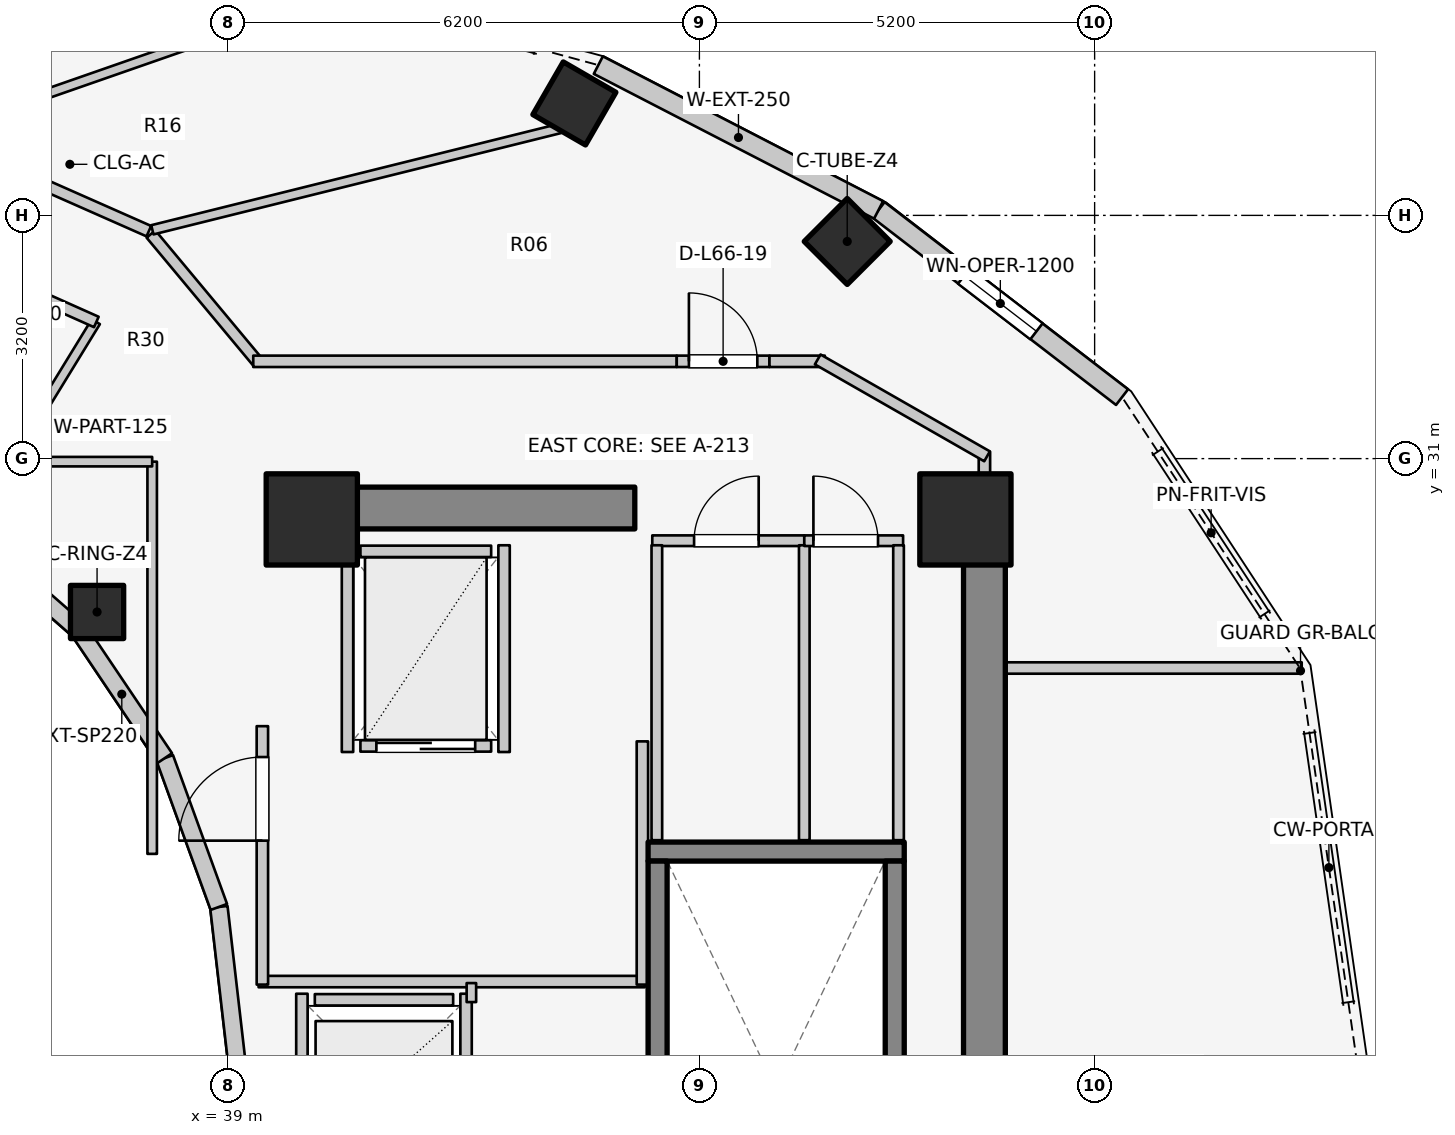
"""IFC4 building model, lengths in metres.
Left out: names, types, materials, properties, quantities, classifications, styles, units other than length and angle.
Written with IfcOpenShell. Run it as: python <this file> out.ifc"""

import sys

from ifc_helpers import new_model, si_unit, direction, frame, frame_2d, origin, origin_2d, place, context, subcontext, project, spatial, rectangle, extrude, element, fill, save


model = new_model("IFC4")
c1 = context("Model", 3, precision=1e-05, world=origin(), true_north=direction((0.0, 1.0)))
c2 = subcontext(c1, "Body", "Model", "MODEL_VIEW")
j1 = project(units=[si_unit("LENGTHUNIT", "METRE"), si_unit("PLANEANGLEUNIT", "RADIAN")], contexts=[c1])
p1 = place(None, origin())
s1 = spatial("IfcSite", under=j1, at=p1, CompositionType="ELEMENT")
p2 = place(p1, origin())
s2 = spatial("IfcBuilding", under=s1, at=p2, CompositionType="ELEMENT")
p3 = place(p2, frame((0.0, 0.0, 217.1)))
s3 = spatial("IfcBuildingStorey", under=s2, at=p3, CompositionType="ELEMENT", Elevation=217.1)
p4 = place(p3, frame((48.95, 17.05, 0.0), z_axis=(0.0, 0.0, 1.0), x_axis=(0.0, 1.0, 0.0)))
e1 = element("IfcWall", 1, at=p4, inside=s3, PredefinedType="SHEAR", context=c2, shape_type="SweptSolid", body=[
    extrude(rectangle(XDim=12.8, YDim=0.55, at=frame_2d((6.4, 0.0))), origin(), (0.0, 0.0, 1.0), 3.1),
])
p5 = place(p3, frame((39.85, 30.35, 0.0), z_axis=(0.0, 0.0, 1.0), x_axis=(1.0, 0.0, 0.0)))
e2 = element("IfcWall", 2, at=p5, inside=s3, PredefinedType="SHEAR", context=c2, shape_type="SweptSolid", body=[
    extrude(rectangle(XDim=4.5, YDim=0.55, at=frame_2d((2.25, 0.0))), origin(), (0.0, 0.0, 1.0), 3.1),
])
p6 = place(p3, frame((44.525, 25.83, 0.0), z_axis=(0.0, 0.0, 1.0), x_axis=(1.0, 0.0, 0.0)))
e3 = element("IfcWall", 3, at=p6, inside=s3, PredefinedType="SOLIDWALL", context=c2, shape_type="SweptSolid", body=[
    extrude(rectangle(XDim=3.37, YDim=0.25, at=frame_2d((1.685, 0.0))), origin(), (0.0, 0.0, 1.0), 3.1),
])
for number, where, z_axis, x_axis in (
    (4, (44.65, 17.895, 0.0), (0.0, 0.0, 1.0), (0.0, 1.0, 0.0)),
    (5, (47.77, 17.895, 0.0), (0.0, 0.0, 1.0), (0.0, 1.0, 0.0)),
):
    element("IfcWall", number, at=place(p3, frame(where, z_axis=z_axis, x_axis=x_axis)), inside=s3, PredefinedType="SOLIDWALL", context=c2, shape_type="SweptSolid", body=[
        extrude(rectangle(XDim=7.81, YDim=0.25, at=frame_2d((3.905, 0.0))), origin(), (0.0, 0.0, 1.0), 3.1),
    ])
for number, where, z_axis, x_axis in (
    (6, (48.7, 30.2, 0.0), (0.0, 0.0, 1.0), (1.0, 0.0, 0.0)),
    (7, (40.1, 30.2, 0.0), (0.0, 0.0, 1.0), (1.0, 0.0, 0.0)),
):
    element("IfcColumn", number, at=place(p3, frame(where, z_axis=z_axis, x_axis=x_axis)), inside=s3, PredefinedType="COLUMN", context=c2, shape_type="SweptSolid", body=[
        extrude(rectangle(XDim=1.2, YDim=1.2, at=origin_2d()), origin(), (0.0, 0.0, 1.0), 3.1),
    ])
p7 = place(p3, frame((37.275, 28.982, 0.0), z_axis=(0.0, 0.0, 1.0), x_axis=(1.0, 0.0, 0.0)))
e8 = element("IfcColumn", 8, at=p7, inside=s3, PredefinedType="COLUMN", context=c2, shape_type="SweptSolid", body=[
    extrude(rectangle(XDim=0.7, YDim=0.7, at=origin_2d()), origin(), (0.0, 0.0, 1.0), 3.1),
])
for number, where, z_axis, x_axis in (
    (9, (47.145, 33.857, 0.0), (0.0, 0.0, 1.0), (0.707, 0.707, 0.0)),
    (10, (43.555, 35.673, 0.0), (0.0, 0.0, 1.0), (0.5, 0.866, 0.0)),
):
    element("IfcColumn", number, at=place(p3, frame(where, z_axis=z_axis, x_axis=x_axis)), inside=s3, PredefinedType="COLUMN", context=c2, shape_type="SweptSolid", body=[
        extrude(rectangle(XDim=0.8, YDim=0.8, at=origin_2d()), origin(), (0.0, 0.0, 1.0), 3.1),
    ])
p8 = place(p3, frame((39.12, 23.0, 0.0), z_axis=(0.0, 0.0, 1.0), x_axis=(-0.114711713601, 0.993398823617, 0.0)))
e11 = element("IfcWall", 11, at=p8, inside=s3, PredefinedType="STANDARD", context=c2, shape_type="SweptSolid", body=[
    extrude(rectangle(XDim=2.115, YDim=0.23, at=frame_2d((1.058, 0.0))), origin(), (0.0, 0.0, 1.0), 2.56),
])
p9 = place(p3, frame((38.877, 25.102, 0.0), z_axis=(0.0, 0.0, 1.0), x_axis=(-0.341423187295, 0.93990968033, 0.0)))
e12 = element("IfcWall", 12, at=p9, inside=s3, PredefinedType="STANDARD", context=c2, shape_type="SweptSolid", body=[
    extrude(rectangle(XDim=2.084, YDim=0.23, at=frame_2d((1.042, 0.0))), origin(), (0.0, 0.0, 1.0), 2.56),
])
p10 = place(p3, frame((38.166, 27.06, 0.0), z_axis=(0.0, 0.0, 1.0), x_axis=(-0.558197800898, 0.829707909492, 0.0)))
e13 = element("IfcWall", 13, at=p10, inside=s3, PredefinedType="STANDARD", context=c2, shape_type="SweptSolid", body=[
    extrude(rectangle(XDim=2.027, YDim=0.23, at=frame_2d((1.013, 0.0))), origin(), (0.0, 0.0, 1.0), 1.22),
])
p11 = place(p3, frame((37.035, 28.742, 0.0), z_axis=(0.0, 0.0, 1.0), x_axis=(-0.752576694707, 0.658504607869, 0.0)))
e14 = element("IfcWall", 14, at=p11, inside=s3, PredefinedType="STANDARD", context=c2, shape_type="SweptSolid", body=[
    extrude(rectangle(XDim=1.959, YDim=0.23, at=frame_2d((0.98, 0.0))), origin(), (0.0, 0.0, 1.0), 1.22),
])
p12 = place(p3, frame((50.761, 31.809, 0.0), z_axis=(0.0, 0.0, 1.0), x_axis=(-0.792713817907, 0.609593965603, 0.0)))
e15 = element("IfcWall", 15, at=p12, inside=s3, PredefinedType="STANDARD", context=c2, shape_type="SweptSolid", body=[
    extrude(rectangle(XDim=4.041, YDim=0.26, at=frame_2d((2.021, 0.0))), origin(), (0.0, 0.0, 1.0), 1.22),
])
p13 = place(p12, frame((1.42, 0.0, 0.15)))
e16 = element("IfcOpeningElement", 16, at=p13, cuts=e15, PredefinedType="OPENING", context=c2, shape_type="SweptSolid", body=[
    extrude(rectangle(XDim=1.2, YDim=0.9, at=frame_2d((0.6, 0.45))), frame((0.0, 0.14, 0.0), z_axis=(0.0, -1.0, 0.0), x_axis=(1.0, 0.0, 0.0)), (0.0, 0.0, 1.0), 0.28),
])
p14 = place(p3, frame((47.558, 34.272, 0.0), z_axis=(0.0, 0.0, 1.0), x_axis=(-0.88849146803, 0.458893137057, 0.0)))
e17 = element("IfcWall", 17, at=p14, inside=s3, PredefinedType="STANDARD", context=c2, shape_type="SweptSolid", body=[
    extrude(rectangle(XDim=4.15, YDim=0.26, at=frame_2d((2.075, 0.0))), origin(), (0.0, 0.0, 1.0), 1.22),
])
p15 = place(p3, frame((40.14, 23.88, 0.0), z_axis=(0.0, 0.0, 1.0), x_axis=(1.0, 0.0, 0.0)))
e18 = element("IfcWall", 18, at=p15, inside=s3, PredefinedType="SOLIDWALL", context=c2, shape_type="SweptSolid", body=[
    extrude(rectangle(XDim=1.82, YDim=0.15, at=frame_2d((0.91, 0.0))), origin(), (0.0, 0.0, 1.0), 2.12),
])
p16 = place(p3, frame((39.97, 21.64, 0.0), z_axis=(0.0, 0.0, 1.0), x_axis=(0.0, 1.0, 0.0)))
e19 = element("IfcWall", 19, at=p16, inside=s3, PredefinedType="SOLIDWALL", context=c2, shape_type="SweptSolid", body=[
    extrude(rectangle(XDim=2.32, YDim=0.15, at=frame_2d((1.16, 0.0))), origin(), (0.0, 0.0, 1.0), 2.12),
])
p17 = place(p3, frame((42.13, 21.64, 0.0), z_axis=(0.0, 0.0, 1.0), x_axis=(0.0, 1.0, 0.0)))
e20 = element("IfcWall", 20, at=p17, inside=s3, PredefinedType="SOLIDWALL", context=c2, shape_type="SweptSolid", body=[
    extrude(rectangle(XDim=2.32, YDim=0.15, at=frame_2d((1.16, 0.0))), origin(), (0.0, 0.0, 1.0), 2.575),
])
p18 = place(p3, frame((40.74, 27.22, 0.0), z_axis=(0.0, 0.0, 1.0), x_axis=(1.0, 0.0, 0.0)))
e21 = element("IfcWall", 21, at=p18, inside=s3, PredefinedType="SOLIDWALL", context=c2, shape_type="SweptSolid", body=[
    extrude(rectangle(XDim=1.72, YDim=0.15, at=frame_2d((0.86, 0.0))), origin(), (0.0, 0.0, 1.0), 2.575),
])
p19 = place(p18, frame((0.21, 0.0, 0.0)))
e22 = element("IfcOpeningElement", 22, at=p19, cuts=e21, PredefinedType="OPENING", context=c2, shape_type="SweptSolid", body=[
    extrude(rectangle(XDim=1.3, YDim=2.1, at=frame_2d((0.65, 1.05))), frame((0.0, 0.085, 0.0), z_axis=(0.0, -1.0, 0.0), x_axis=(1.0, 0.0, 0.0)), (0.0, 0.0, 1.0), 0.17),
])
p20 = place(p3, frame((40.74, 29.78, 0.0), z_axis=(0.0, 0.0, 1.0), x_axis=(1.0, 0.0, 0.0)))
e23 = element("IfcWall", 23, at=p20, inside=s3, PredefinedType="SOLIDWALL", context=c2, shape_type="SweptSolid", body=[
    extrude(rectangle(XDim=1.72, YDim=0.15, at=frame_2d((0.86, 0.0))), origin(), (0.0, 0.0, 1.0), 2.575),
])
for number, where, z_axis, x_axis in (
    (24, (40.57, 27.14, 0.0), (0.0, 0.0, 1.0), (0.0, 1.0, 0.0)),
    (25, (42.63, 27.14, 0.0), (0.0, 0.0, 1.0), (0.0, 1.0, 0.0)),
):
    element("IfcWall", number, at=place(p3, frame(where, z_axis=z_axis, x_axis=x_axis)), inside=s3, PredefinedType="SOLIDWALL", context=c2, shape_type="SweptSolid", body=[
        extrude(rectangle(XDim=2.72, YDim=0.15, at=frame_2d((1.36, 0.0))), origin(), (0.0, 0.0, 1.0), 2.575),
    ])
p21 = place(p3, frame((39.4, 24.12, 0.0), z_axis=(0.0, 0.0, 1.0), x_axis=(1.0, 0.0, 0.0)))
e26 = element("IfcWall", 26, at=p21, inside=s3, PredefinedType="PARTITIONING", context=c2, shape_type="SweptSolid", body=[
    extrude(rectangle(XDim=5.08, YDim=0.15, at=frame_2d((2.54, 0.0))), origin(), (0.0, 0.0, 1.0), 2.12),
])
p22 = place(p3, frame((44.45, 24.08, 0.0), z_axis=(0.0, 0.0, 1.0), x_axis=(0.0, 1.0, 0.0)))
e27 = element("IfcWall", 27, at=p22, inside=s3, PredefinedType="PARTITIONING", context=c2, shape_type="SweptSolid", body=[
    extrude(rectangle(XDim=3.2, YDim=0.15, at=frame_2d((1.6, 0.0))), origin(), (0.0, 0.0, 1.0), 2.575),
])
p23 = place(p3, frame((39.45, 24.08, 0.0), z_axis=(0.0, 0.0, 1.0), x_axis=(0.0, 1.0, 0.0)))
e28 = element("IfcWall", 28, at=p23, inside=s3, PredefinedType="PARTITIONING", context=c2, shape_type="SweptSolid", body=[
    extrude(rectangle(XDim=3.4, YDim=0.15, at=frame_2d((1.7, 0.0))), origin(), (0.0, 0.0, 1.0), 2.575),
])
p24 = place(p23, frame((1.894, 0.0, 0.0)))
e29 = element("IfcOpeningElement", 29, at=p24, cuts=e28, PredefinedType="OPENING", context=c2, shape_type="SweptSolid", body=[
    extrude(rectangle(XDim=1.1, YDim=2.1, at=frame_2d((0.55, 1.05))), frame((0.0, 0.085, 0.0), z_axis=(0.0, -1.0, 0.0), x_axis=(1.0, 0.0, 0.0)), (0.0, 0.0, 1.0), 0.17),
])
p25 = place(p3, frame((42.2, 23.85, 0.0), z_axis=(0.0, 0.0, 1.0), x_axis=(0.0, 1.0, 0.0)))
e30 = element("IfcWall", 30, at=p25, inside=s3, PredefinedType="PARTITIONING", context=c2, shape_type="SweptSolid", body=[
    extrude(rectangle(XDim=0.25, YDim=0.125, at=frame_2d((0.125, 0.0))), origin(), (0.0, 0.0, 1.0), 2.575),
])
p26 = place(p3, frame((44.58, 29.92, 0.0), z_axis=(0.0, 0.0, 1.0), x_axis=(1.0, 0.0, 0.0)))
e31 = element("IfcWall", 31, at=p26, inside=s3, PredefinedType="PLUMBINGWALL", context=c2, shape_type="SweptSolid", body=[
    extrude(rectangle(XDim=2.0, YDim=0.14, at=frame_2d((1.0, 0.0))), origin(), (0.0, 0.0, 1.0), 2.575),
])
p27 = place(p26, frame((0.55, 0.0, 0.0)))
e32 = element("IfcOpeningElement", 32, at=p27, cuts=e31, PredefinedType="OPENING", context=c2, shape_type="SweptSolid", body=[
    extrude(rectangle(XDim=0.85, YDim=2.05, at=frame_2d((0.425, 1.025))), frame((0.0, 0.08, 0.0), z_axis=(0.0, -1.0, 0.0), x_axis=(1.0, 0.0, 0.0)), (0.0, 0.0, 1.0), 0.16),
])
for number, where, z_axis, x_axis in (
    (33, (44.64, 25.98, 0.0), (0.0, 0.0, 1.0), (0.0, 1.0, 0.0)),
    (34, (46.58, 25.98, 0.0), (0.0, 0.0, 1.0), (0.0, 1.0, 0.0)),
):
    element("IfcWall", number, at=place(p3, frame(where, z_axis=z_axis, x_axis=x_axis)), inside=s3, PredefinedType="PLUMBINGWALL", context=c2, shape_type="SweptSolid", body=[
        extrude(rectangle(XDim=3.88, YDim=0.14, at=frame_2d((1.94, 0.0))), origin(), (0.0, 0.0, 1.0), 2.575),
    ])
p28 = place(p3, frame((46.58, 29.92, 0.0), z_axis=(0.0, 0.0, 1.0), x_axis=(1.0, 0.0, 0.0)))
e35 = element("IfcWall", 35, at=p28, inside=s3, PredefinedType="PLUMBINGWALL", context=c2, shape_type="SweptSolid", body=[
    extrude(rectangle(XDim=1.3, YDim=0.14, at=frame_2d((0.65, 0.0))), origin(), (0.0, 0.0, 1.0), 2.575),
])
p29 = place(p28, frame((0.12, 0.0, 0.0)))
e36 = element("IfcOpeningElement", 36, at=p29, cuts=e35, PredefinedType="OPENING", context=c2, shape_type="SweptSolid", body=[
    extrude(rectangle(XDim=0.85, YDim=2.05, at=frame_2d((0.425, 1.025))), frame((0.0, 0.08, 0.0), z_axis=(0.0, -1.0, 0.0), x_axis=(1.0, 0.0, 0.0)), (0.0, 0.0, 1.0), 0.16),
])
p30 = place(p3, frame((47.82, 25.98, 0.0), z_axis=(0.0, 0.0, 1.0), x_axis=(0.0, 1.0, 0.0)))
e37 = element("IfcWall", 37, at=p30, inside=s3, PredefinedType="PLUMBINGWALL", context=c2, shape_type="SweptSolid", body=[
    extrude(rectangle(XDim=3.88, YDim=0.14, at=frame_2d((1.94, 0.0))), origin(), (0.0, 0.0, 1.0), 2.575),
])
p31 = place(p3, frame((35.55, 30.015, 0.0), z_axis=(0.0, 0.0, 1.0), x_axis=(0.522763432117, 0.852477796802, 0.0)))
e38 = element("IfcWall", 38, at=p31, inside=s3, PredefinedType="PARTITIONING", context=c2, shape_type="SweptSolid", body=[
    extrude(rectangle(XDim=3.269, YDim=0.125, at=frame_2d((1.635, 0.0))), origin(), (0.0, 0.0, 1.0), 1.22),
])
p32 = place(p3, frame((37.265, 32.798, 0.0), z_axis=(0.0, 0.0, 1.0), x_axis=(-0.913254317828, 0.407389924971, 0.0)))
e39 = element("IfcWall", 39, at=p32, inside=s3, PredefinedType="PARTITIONING", context=c2, shape_type="SweptSolid", body=[
    extrude(rectangle(XDim=2.787, YDim=0.15, at=frame_2d((1.393, 0.0))), origin(), (0.0, 0.0, 1.0), 1.22),
])
p33 = place(p3, frame((38.0, 25.8, 0.0), z_axis=(0.0, 0.0, 1.0), x_axis=(0.0, 1.0, 0.0)))
e40 = element("IfcWall", 40, at=p33, inside=s3, PredefinedType="PARTITIONING", context=c2, shape_type="SweptSolid", body=[
    extrude(rectangle(XDim=5.16, YDim=0.125, at=frame_2d((2.58, 0.0))), origin(), (0.0, 0.0, 1.0), 1.952),
])
p34 = place(p3, frame((35.4, 30.96, 0.0), z_axis=(0.0, 0.0, 1.0), x_axis=(1.0, 0.0, 0.0)))
e41 = element("IfcWall", 41, at=p34, inside=s3, PredefinedType="PARTITIONING", context=c2, shape_type="SweptSolid", body=[
    extrude(rectangle(XDim=2.6, YDim=0.125, at=frame_2d((1.3, 0.0))), origin(), (0.0, 0.0, 1.0), 1.22),
])
p35 = place(p3, frame((48.95, 28.245, 0.0), z_axis=(0.0, 0.0, 1.0), x_axis=(1.0, 0.0, 0.0)))
e42 = element("IfcWall", 42, at=p35, inside=s3, PredefinedType="PARTITIONING", context=c2, shape_type="SweptSolid", body=[
    extrude(rectangle(XDim=4.175, YDim=0.15, at=frame_2d((2.087, 0.0))), origin(), (0.0, 0.0, 1.0), 2.575),
])
p36 = place(p3, frame((48.95, 29.8, 0.0), z_axis=(0.0, 0.0, 1.0), x_axis=(0.0, 1.0, 0.0)))
e43 = element("IfcWall", 43, at=p36, inside=s3, PredefinedType="PARTITIONING", context=c2, shape_type="SweptSolid", body=[
    extrude(rectangle(XDim=1.29, YDim=0.15, at=frame_2d((0.645, 0.0))), origin(), (0.0, 0.0, 1.0), 1.22),
])
p37 = place(p3, frame((37.984, 33.955, 0.0), z_axis=(0.0, 0.0, 1.0), x_axis=(0.64030392053, -0.76812166312, 0.0)))
e44 = element("IfcWall", 44, at=p37, inside=s3, PredefinedType="PARTITIONING", context=c2, shape_type="SweptSolid", body=[
    extrude(rectangle(XDim=2.21, YDim=0.15, at=frame_2d((1.105, 0.0))), origin(), (0.0, 0.0, 1.0), 1.22),
])
p38 = place(p3, frame((39.33, 32.28, 0.0), z_axis=(0.0, 0.0, 1.0), x_axis=(1.0, 0.0, 0.0)))
e45 = element("IfcWall", 45, at=p38, inside=s3, PredefinedType="PARTITIONING", context=c2, shape_type="SweptSolid", body=[
    extrude(rectangle(XDim=5.572, YDim=0.15, at=frame_2d((2.786, 0.0))), origin(), (0.0, 0.0, 1.0), 1.22),
])
p39 = place(p3, frame((44.902, 32.28, 0.0), z_axis=(0.0, 0.0, 1.0), x_axis=(1.0, 0.0, 0.0)))
e46 = element("IfcWall", 46, at=p39, inside=s3, PredefinedType="PARTITIONING", context=c2, shape_type="SweptSolid", body=[
    extrude(rectangle(XDim=1.22, YDim=0.15, at=frame_2d((0.61, 0.0))), origin(), (0.0, 0.0, 1.0), 2.16),
])
p40 = place(p39, frame((0.16, 0.0, 0.0)))
e47 = element("IfcOpeningElement", 47, at=p40, cuts=e46, PredefinedType="OPENING", context=c2, shape_type="SweptSolid", body=[
    extrude(rectangle(XDim=0.9, YDim=2.1, at=frame_2d((0.45, 1.05))), frame((0.0, 0.085, 0.0), z_axis=(0.0, -1.0, 0.0), x_axis=(1.0, 0.0, 0.0)), (0.0, 0.0, 1.0), 0.17),
])
p41 = place(p3, frame((46.122, 32.28, 0.0), z_axis=(0.0, 0.0, 1.0), x_axis=(1.0, 0.0, 0.0)))
e48 = element("IfcWall", 48, at=p41, inside=s3, PredefinedType="PARTITIONING", context=c2, shape_type="SweptSolid", body=[
    extrude(rectangle(XDim=0.728, YDim=0.15, at=frame_2d((0.364, 0.0))), origin(), (0.0, 0.0, 1.0), 2.575),
])
p42 = place(p3, frame((46.757, 32.305, 0.0), z_axis=(0.0, 0.0, 1.0), x_axis=(0.867991349648, -0.496579315857, 0.0)))
e49 = element("IfcWall", 49, at=p42, inside=s3, PredefinedType="PARTITIONING", context=c2, shape_type="SweptSolid", body=[
    extrude(rectangle(XDim=2.567, YDim=0.15, at=frame_2d((1.283, 0.0))), origin(), (0.0, 0.0, 1.0), 1.22),
])
p43 = place(p3, frame((38.002, 34.01, 0.0), z_axis=(0.0, 0.0, 1.0), x_axis=(0.970445810114, 0.241319144769, 0.0)))
e50 = element("IfcWall", 50, at=p43, inside=s3, PredefinedType="PARTITIONING", context=c2, shape_type="SweptSolid", body=[
    extrude(rectangle(XDim=5.526, YDim=0.125, at=frame_2d((2.763, 0.0))), origin(), (0.0, 0.0, 1.0), 1.22),
])
p44 = place(p3, frame((35.131, 35.283, 0.0), z_axis=(0.0, 0.0, 1.0), x_axis=(0.944311395416, 0.329053169697, 0.0)))
e51 = element("IfcWall", 51, at=p44, inside=s3, PredefinedType="PARTITIONING", context=c2, shape_type="SweptSolid", body=[
    extrude(rectangle(XDim=3.84, YDim=0.125, at=frame_2d((1.92, 0.0))), origin(), (0.0, 0.0, 1.0), 1.22),
])
p45 = place(p3, frame((37.956, 33.992, 0.0), z_axis=(0.0, 0.0, 1.0), x_axis=(-0.914654802586, 0.404235812499, 0.0)))
e52 = element("IfcWall", 52, at=p45, inside=s3, PredefinedType="PARTITIONING", context=c2, shape_type="SweptSolid", body=[
    extrude(rectangle(XDim=1.584, YDim=0.15, at=frame_2d((0.792, 0.0))), origin(), (0.0, 0.0, 1.0), 1.22),
])
p46 = place(p13, origin())
e53 = element("IfcWindow", 53, at=p46, inside=s3, PartitioningType="SINGLE_PANEL", PredefinedType="WINDOW", context=c2, shape_type="SweptSolid", body=[
    extrude(rectangle(XDim=1.2, YDim=0.9, at=frame_2d((0.6, 0.45))), frame((0.0, 0.03, 0.0), z_axis=(0.0, -1.0, 0.0), x_axis=(1.0, 0.0, 0.0)), (0.0, 0.0, 1.0), 0.06),
])
fill(e16, e53)
p47 = place(p19, origin())
e54 = element("IfcDoor", 54, at=p47, inside=s3, OperationType="DOUBLE_DOOR_SLIDING", PredefinedType="DOOR", context=c2, shape_type="SweptSolid", body=[
    extrude(rectangle(XDim=1.3, YDim=2.1, at=frame_2d((0.65, 1.05))), frame((0.0, 0.025, 0.0), z_axis=(0.0, -1.0, 0.0), x_axis=(1.0, 0.0, 0.0)), (0.0, 0.0, 1.0), 0.05),
])
fill(e22, e54)
p48 = place(p24, origin())
e55 = element("IfcDoor", 55, at=p48, inside=s3, OperationType="SINGLE_SWING_LEFT", PredefinedType="DOOR", context=c2, shape_type="SweptSolid", body=[
    extrude(rectangle(XDim=1.1, YDim=2.1, at=frame_2d((0.55, 1.05))), frame((0.0, 0.025, 0.0), z_axis=(0.0, -1.0, 0.0), x_axis=(1.0, 0.0, 0.0)), (0.0, 0.0, 1.0), 0.05),
])
fill(e29, e55)
p49 = place(p27, origin())
e56 = element("IfcDoor", 56, at=p49, inside=s3, OperationType="SINGLE_SWING_RIGHT", PredefinedType="DOOR", context=c2, shape_type="SweptSolid", body=[
    extrude(rectangle(XDim=0.85, YDim=2.05, at=frame_2d((0.425, 1.025))), frame((0.0, 0.025, 0.0), z_axis=(0.0, -1.0, 0.0), x_axis=(1.0, 0.0, 0.0)), (0.0, 0.0, 1.0), 0.05),
])
fill(e32, e56)
p50 = place(p29, origin())
e57 = element("IfcDoor", 57, at=p50, inside=s3, OperationType="SINGLE_SWING_LEFT", PredefinedType="DOOR", context=c2, shape_type="SweptSolid", body=[
    extrude(rectangle(XDim=0.85, YDim=2.05, at=frame_2d((0.425, 1.025))), frame((0.0, 0.025, 0.0), z_axis=(0.0, -1.0, 0.0), x_axis=(1.0, 0.0, 0.0)), (0.0, 0.0, 1.0), 0.05),
])
fill(e36, e57)
p51 = place(p40, origin())
e58 = element("IfcDoor", 58, at=p51, inside=s3, OperationType="SINGLE_SWING_LEFT", PredefinedType="DOOR", context=c2, shape_type="SweptSolid", body=[
    extrude(rectangle(XDim=0.9, YDim=2.1, at=frame_2d((0.45, 1.05))), frame((0.0, 0.025, 0.0), z_axis=(0.0, -1.0, 0.0), x_axis=(1.0, 0.0, 0.0)), (0.0, 0.0, 1.0), 0.05),
])
fill(e47, e58)
save(model, sys.argv[1])
